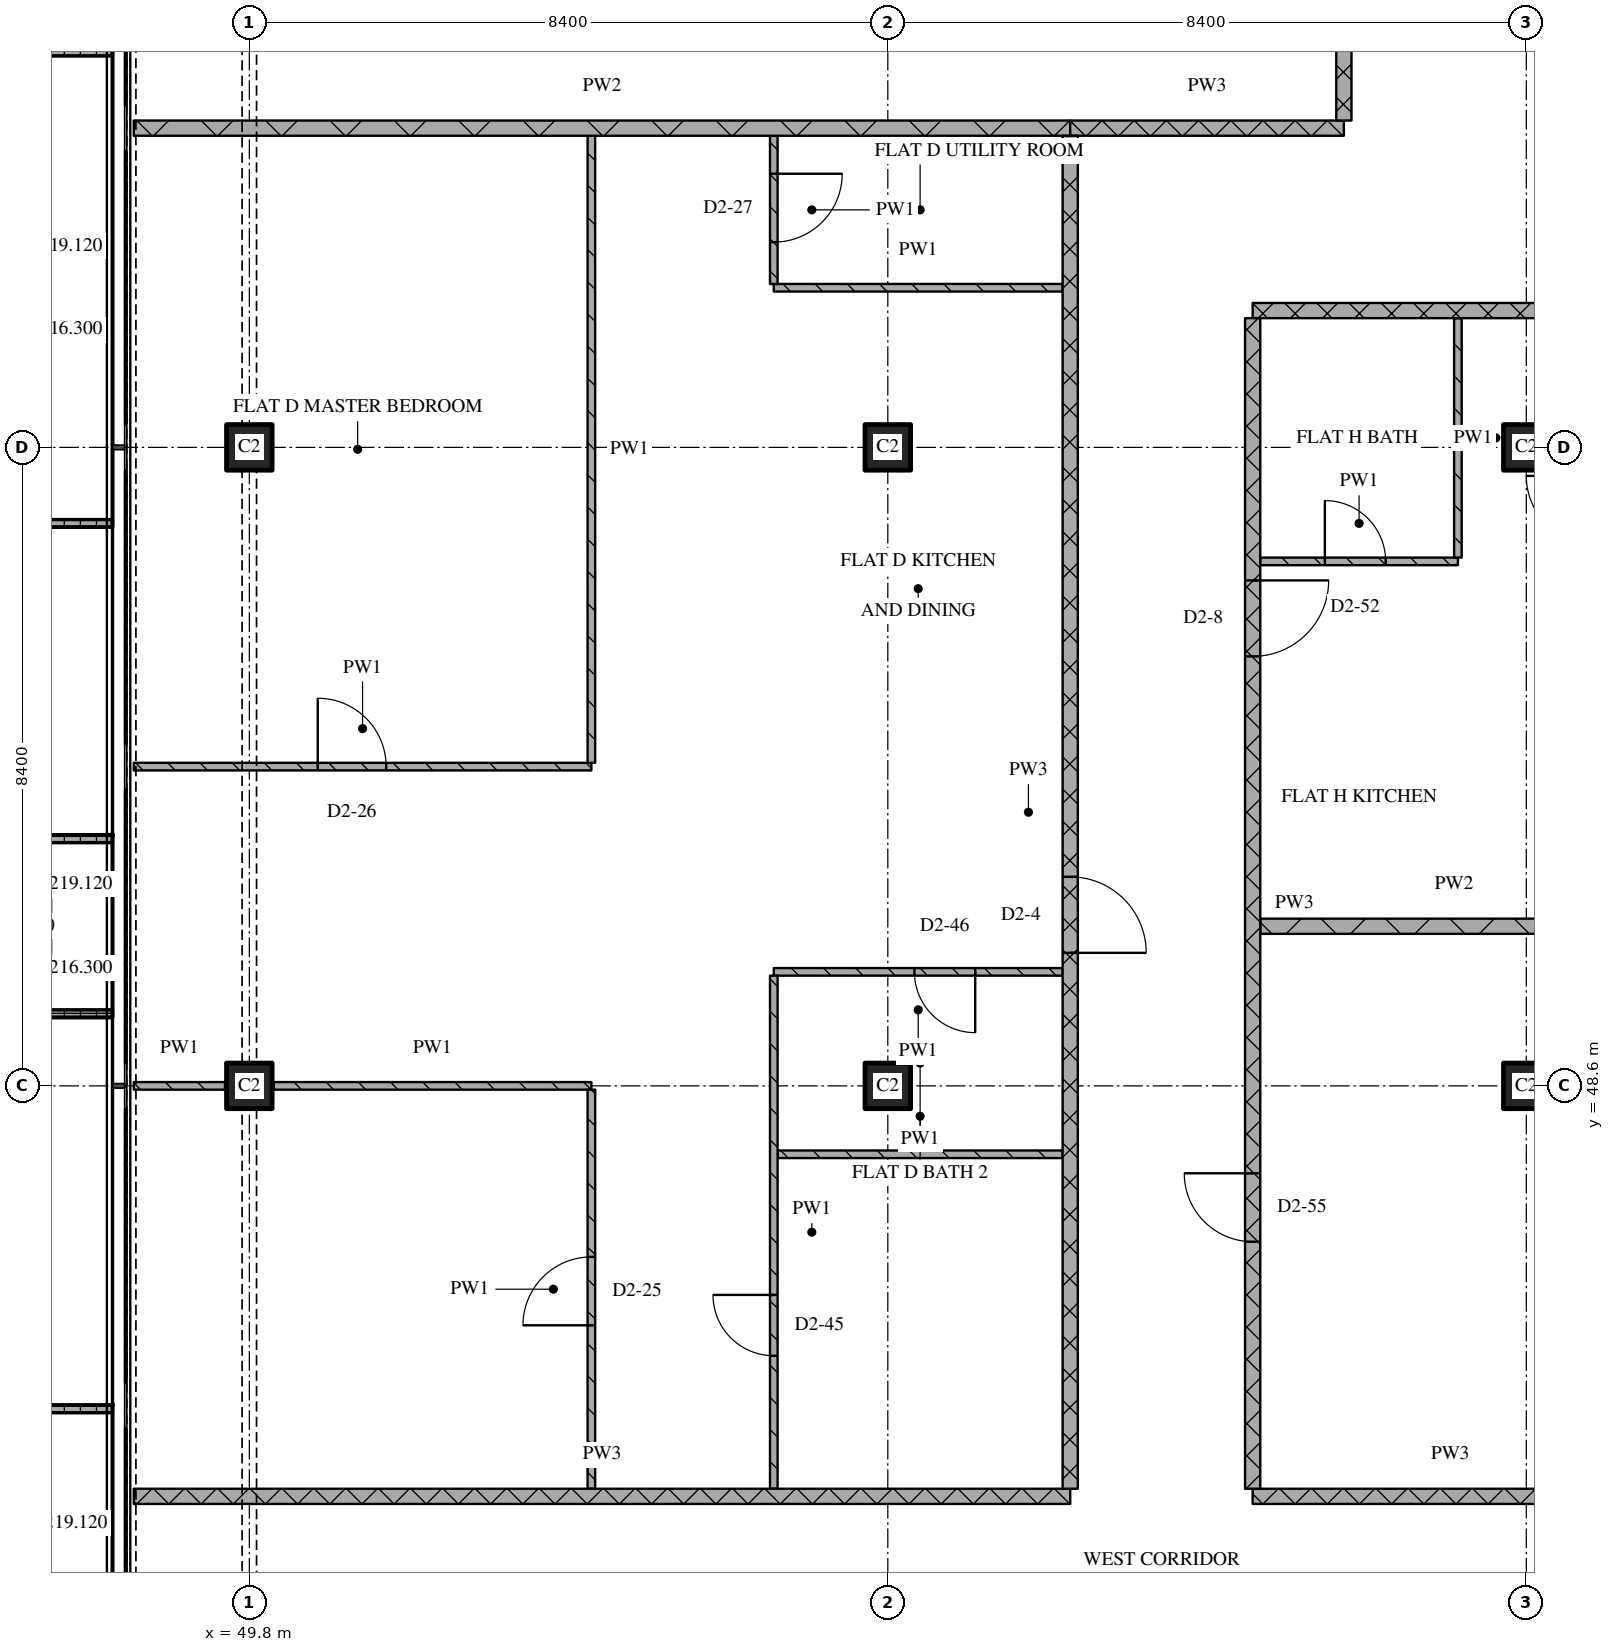
"""IFC4 building model, lengths in metres.
Left out: names, types, materials, properties, quantities, classifications, styles, units other than length and angle.
Written with IfcOpenShell. Run it as: python <this file> out.ifc"""

import sys

from ifc_helpers import new_model, si_unit, direction, frame, frame_2d, origin, origin_2d, place, context, subcontext, project, spatial, polyline, rectangle, outline, extrude, element, fill, save


model = new_model("IFC4")
c1 = context("Model", 3, precision=1e-05, world=origin(), true_north=direction((0.0, 1.0)))
c2 = subcontext(c1, "Body", "Model", "MODEL_VIEW")
j1 = project(units=[si_unit("LENGTHUNIT", "METRE"), si_unit("PLANEANGLEUNIT", "RADIAN")], contexts=[c1])
p1 = place(None, origin())
s1 = spatial("IfcSite", under=j1, at=p1, CompositionType="ELEMENT")
p2 = place(p1, origin())
s2 = spatial("IfcBuilding", under=s1, at=p2, CompositionType="ELEMENT")
p3 = place(p2, frame((0.0, 0.0, 216.3)))
s3 = spatial("IfcBuildingStorey", under=s2, at=p3, CompositionType="ELEMENT", Elevation=216.3)
for number, where, z_axis, x_axis in (
    (1, (49.8, 48.6, 0.0), (0.0, 0.0, 1.0), (1.0, 0.0, 0.0)),
    (2, (49.8, 57.0, 0.0), (0.0, 0.0, 1.0), (1.0, 0.0, 0.0)),
    (3, (58.2, 48.6, 0.0), (0.0, 0.0, 1.0), (1.0, 0.0, 0.0)),
    (4, (58.2, 57.0, 0.0), (0.0, 0.0, 1.0), (1.0, 0.0, 0.0)),
    (5, (66.6, 48.6, 0.0), (0.0, 0.0, 1.0), (1.0, 0.0, 0.0)),
    (6, (66.6, 57.0, 0.0), (0.0, 0.0, 1.0), (1.0, 0.0, 0.0)),
):
    element("IfcColumn", number, at=place(p3, frame(where, z_axis=z_axis, x_axis=x_axis)), inside=s3, PredefinedType="COLUMN", context=c2, shape_type="SweptSolid", body=[
        extrude(rectangle(XDim=0.6, YDim=0.6, at=origin_2d()), origin(), (0.0, 0.0, 1.0), 3.6),
    ])
p4 = place(p3, origin())
e7 = element("IfcWall", 7, at=p4, inside=s3, PredefinedType="SOLIDWALL", context=c2, shape_type="SweptSolid", body=[
    extrude(outline(polyline([(48.0, 62.25), (48.0, 62.15), (46.233, 62.15), (46.233, 56.05), (48.0, 56.05), (48.0, 55.95), (46.133, 55.95), (46.133, 62.25), (48.0, 62.25)])), origin(), (0.0, 0.0, 1.0), 1.0),
])
p5 = place(p3, origin())
e8 = element("IfcWall", 8, at=p5, inside=s3, PredefinedType="SOLIDWALL", context=c2, shape_type="SweptSolid", body=[
    extrude(outline(polyline([(48.0, 51.9), (48.0, 51.8), (46.5, 51.8), (46.5, 49.6), (48.0, 49.6), (48.0, 49.5), (46.4, 49.5), (46.4, 51.9), (48.0, 51.9)])), origin(), (0.0, 0.0, 1.0), 1.0),
])
p6 = place(p3, origin())
e9 = element("IfcWall", 9, at=p6, inside=s3, PredefinedType="SOLIDWALL", context=c2, shape_type="SweptSolid", body=[
    extrude(outline(polyline([(48.0, 44.4), (48.0, 44.3), (46.367, 44.3), (46.367, 40.3), (48.0, 40.3), (48.0, 40.2), (46.267, 40.2), (46.267, 44.4), (48.0, 44.4)])), origin(), (0.0, 0.0, 1.0), 1.0),
])
p7 = place(p3, frame((48.28, 43.2, 0.0), z_axis=(0.0, 0.0, 1.0), x_axis=(1.0, 0.0, 0.0)))
e10 = element("IfcWall", 10, at=p7, inside=s3, PredefinedType="PARTITIONING", context=c2, shape_type="SweptSolid", body=[
    extrude(rectangle(XDim=12.32, YDim=0.2, at=frame_2d((6.16, 0.0))), origin(), (0.0, 0.0, 1.0), 3.32),
])
p8 = place(p3, frame((63.0, 43.2, 0.0), z_axis=(0.0, 0.0, 1.0), x_axis=(1.0, 0.0, 0.0)))
e11 = element("IfcWall", 11, at=p8, inside=s3, PredefinedType="PARTITIONING", context=c2, shape_type="SweptSolid", body=[
    extrude(rectangle(XDim=5.2, YDim=0.2, at=frame_2d((2.6, 0.0))), origin(), (0.0, 0.0, 1.0), 3.32),
])
p9 = place(p3, frame((56.75, 47.7, 0.0), z_axis=(0.0, 0.0, 1.0), x_axis=(1.0, 0.0, 0.0)))
e12 = element("IfcWall", 12, at=p9, inside=s3, PredefinedType="PARTITIONING", context=c2, shape_type="SweptSolid", body=[
    extrude(rectangle(XDim=3.75, YDim=0.1, at=frame_2d((1.875, 0.0))), origin(), (0.0, 0.0, 1.0), 3.32),
])
p10 = place(p3, frame((48.28, 48.6, 0.0), z_axis=(0.0, 0.0, 1.0), x_axis=(1.0, 0.0, 0.0)))
e13 = element("IfcWall", 13, at=p10, inside=s3, PredefinedType="PARTITIONING", context=c2, shape_type="SweptSolid", body=[
    extrude(rectangle(XDim=1.2, YDim=0.1, at=frame_2d((0.6, 0.0))), origin(), (0.0, 0.0, 1.0), 3.32),
])
p11 = place(p3, frame((50.12, 48.6, 0.0), z_axis=(0.0, 0.0, 1.0), x_axis=(1.0, 0.0, 0.0)))
e14 = element("IfcWall", 14, at=p11, inside=s3, PredefinedType="PARTITIONING", context=c2, shape_type="SweptSolid", body=[
    extrude(rectangle(XDim=4.18, YDim=0.1, at=frame_2d((2.09, 0.0))), origin(), (0.0, 0.0, 1.0), 3.32),
])
p12 = place(p3, frame((60.5, 50.1, 0.0), z_axis=(0.0, 0.0, 1.0), x_axis=(-1.0, 0.0, 0.0)))
e15 = element("IfcWall", 15, at=p12, inside=s3, PredefinedType="PARTITIONING", context=c2, shape_type="SweptSolid", body=[
    extrude(rectangle(XDim=3.8, YDim=0.1, at=frame_2d((1.9, 0.0))), origin(), (0.0, 0.0, 1.0), 3.32),
])
p13 = place(p12, frame((1.15, 0.0, 0.0)))
e16 = element("IfcOpeningElement", 16, at=p13, cuts=e15, PredefinedType="OPENING", context=c2, shape_type="SweptSolid", body=[
    extrude(rectangle(XDim=0.8, YDim=2.1, at=frame_2d((0.4, 1.05))), frame((0.0, 0.06, 0.0), z_axis=(0.0, -1.0, 0.0), x_axis=(1.0, 0.0, 0.0)), (0.0, 0.0, 1.0), 0.12),
])
p14 = place(p3, frame((63.1, 50.7, 0.0), z_axis=(0.0, 0.0, 1.0), x_axis=(1.0, 0.0, 0.0)))
e17 = element("IfcWall", 17, at=p14, inside=s3, PredefinedType="PARTITIONING", context=c2, shape_type="SweptSolid", body=[
    extrude(rectangle(XDim=5.1, YDim=0.2, at=frame_2d((2.55, 0.0))), origin(), (0.0, 0.0, 1.0), 3.32),
])
p15 = place(p3, frame((48.28, 52.8, 0.0), z_axis=(0.0, 0.0, 1.0), x_axis=(1.0, 0.0, 0.0)))
e18 = element("IfcWall", 18, at=p15, inside=s3, PredefinedType="PARTITIONING", context=c2, shape_type="SweptSolid", body=[
    extrude(rectangle(XDim=6.02, YDim=0.1, at=frame_2d((3.01, 0.0))), origin(), (0.0, 0.0, 1.0), 3.32),
])
p16 = place(p15, frame((2.42, 0.0, 0.0)))
e19 = element("IfcOpeningElement", 19, at=p16, cuts=e18, PredefinedType="OPENING", context=c2, shape_type="SweptSolid", body=[
    extrude(rectangle(XDim=0.9, YDim=2.1, at=frame_2d((0.45, 1.05))), frame((0.0, 0.06, 0.0), z_axis=(0.0, -1.0, 0.0), x_axis=(1.0, 0.0, 0.0)), (0.0, 0.0, 1.0), 0.12),
])
p17 = place(p3, frame((63.1, 55.5, 0.0), z_axis=(0.0, 0.0, 1.0), x_axis=(1.0, 0.0, 0.0)))
e20 = element("IfcWall", 20, at=p17, inside=s3, PredefinedType="PARTITIONING", context=c2, shape_type="SweptSolid", body=[
    extrude(rectangle(XDim=2.6, YDim=0.1, at=frame_2d((1.3, 0.0))), origin(), (0.0, 0.0, 1.0), 3.32),
])
p18 = place(p17, frame((0.85, 0.0, 0.0)))
e21 = element("IfcOpeningElement", 21, at=p18, cuts=e20, PredefinedType="OPENING", context=c2, shape_type="SweptSolid", body=[
    extrude(rectangle(XDim=0.8, YDim=2.1, at=frame_2d((0.4, 1.05))), frame((0.0, 0.06, 0.0), z_axis=(0.0, -1.0, 0.0), x_axis=(1.0, 0.0, 0.0)), (0.0, 0.0, 1.0), 0.12),
])
p19 = place(p3, frame((63.0, 58.8, 0.0), z_axis=(0.0, 0.0, 1.0), x_axis=(1.0, 0.0, 0.0)))
e22 = element("IfcWall", 22, at=p19, inside=s3, PredefinedType="PARTITIONING", context=c2, shape_type="SweptSolid", body=[
    extrude(rectangle(XDim=10.8, YDim=0.2, at=frame_2d((5.4, 0.0))), origin(), (0.0, 0.0, 1.0), 3.32),
])
p20 = place(p3, frame((56.7, 59.1, 0.0), z_axis=(0.0, 0.0, 1.0), x_axis=(1.0, 0.0, 0.0)))
e23 = element("IfcWall", 23, at=p20, inside=s3, PredefinedType="PARTITIONING", context=c2, shape_type="SweptSolid", body=[
    extrude(rectangle(XDim=3.8, YDim=0.1, at=frame_2d((1.9, 0.0))), origin(), (0.0, 0.0, 1.0), 3.32),
])
p21 = place(p3, frame((60.6, 61.2, 0.0), z_axis=(0.0, 0.0, 1.0), x_axis=(1.0, 0.0, 0.0)))
e24 = element("IfcWall", 24, at=p21, inside=s3, PredefinedType="PARTITIONING", context=c2, shape_type="SweptSolid", body=[
    extrude(rectangle(XDim=3.6, YDim=0.2, at=frame_2d((1.8, 0.0))), origin(), (0.0, 0.0, 1.0), 3.32),
])
p22 = place(p3, frame((48.28, 61.2, 0.0), z_axis=(0.0, 0.0, 1.0), x_axis=(1.0, 0.0, 0.0)))
e25 = element("IfcWall", 25, at=p22, inside=s3, PredefinedType="PARTITIONING", context=c2, shape_type="SweptSolid", body=[
    extrude(rectangle(XDim=12.32, YDim=0.2, at=frame_2d((6.16, 0.0))), origin(), (0.0, 0.0, 1.0), 3.32),
])
p23 = place(p3, frame((54.3, 43.3, 0.0), z_axis=(0.0, 0.0, 1.0), x_axis=(0.0, 1.0, 0.0)))
e26 = element("IfcWall", 26, at=p23, inside=s3, PredefinedType="PARTITIONING", context=c2, shape_type="SweptSolid", body=[
    extrude(rectangle(XDim=5.25, YDim=0.1, at=frame_2d((2.625, 0.0))), origin(), (0.0, 0.0, 1.0), 3.32),
])
p24 = place(p23, frame((2.15, 0.0, 0.0)))
e27 = element("IfcOpeningElement", 27, at=p24, cuts=e26, PredefinedType="OPENING", context=c2, shape_type="SweptSolid", body=[
    extrude(rectangle(XDim=0.9, YDim=2.1, at=frame_2d((0.45, 1.05))), frame((0.0, 0.06, 0.0), z_axis=(0.0, -1.0, 0.0), x_axis=(1.0, 0.0, 0.0)), (0.0, 0.0, 1.0), 0.12),
])
p25 = place(p3, frame((54.3, 61.1, 0.0), z_axis=(0.0, 0.0, 1.0), x_axis=(0.0, -1.0, 0.0)))
e28 = element("IfcWall", 28, at=p25, inside=s3, PredefinedType="PARTITIONING", context=c2, shape_type="SweptSolid", body=[
    extrude(rectangle(XDim=8.25, YDim=0.1, at=frame_2d((4.125, 0.0))), origin(), (0.0, 0.0, 1.0), 3.32),
])
p26 = place(p3, frame((56.7, 50.05, 0.0), z_axis=(0.0, 0.0, 1.0), x_axis=(0.0, -1.0, 0.0)))
e29 = element("IfcWall", 29, at=p26, inside=s3, PredefinedType="PARTITIONING", context=c2, shape_type="SweptSolid", body=[
    extrude(rectangle(XDim=6.75, YDim=0.1, at=frame_2d((3.375, 0.0))), origin(), (0.0, 0.0, 1.0), 3.32),
])
p27 = place(p26, frame((4.2, 0.0, 0.0)))
e30 = element("IfcOpeningElement", 30, at=p27, cuts=e29, PredefinedType="OPENING", context=c2, shape_type="SweptSolid", body=[
    extrude(rectangle(XDim=0.8, YDim=2.1, at=frame_2d((0.4, 1.05))), frame((0.0, 0.06, 0.0), z_axis=(0.0, -1.0, 0.0), x_axis=(1.0, 0.0, 0.0)), (0.0, 0.0, 1.0), 0.12),
])
p28 = place(p3, frame((56.7, 61.1, 0.0), z_axis=(0.0, 0.0, 1.0), x_axis=(0.0, -1.0, 0.0)))
e31 = element("IfcWall", 31, at=p28, inside=s3, PredefinedType="PARTITIONING", context=c2, shape_type="SweptSolid", body=[
    extrude(rectangle(XDim=1.95, YDim=0.1, at=frame_2d((0.975, 0.0))), origin(), (0.0, 0.0, 1.0), 3.32),
])
p29 = place(p28, frame((0.5, 0.0, 0.0)))
e32 = element("IfcOpeningElement", 32, at=p29, cuts=e31, PredefinedType="OPENING", context=c2, shape_type="SweptSolid", body=[
    extrude(rectangle(XDim=0.9, YDim=2.1, at=frame_2d((0.45, 1.05))), frame((0.0, 0.06, 0.0), z_axis=(0.0, -1.0, 0.0), x_axis=(1.0, 0.0, 0.0)), (0.0, 0.0, 1.0), 0.12),
])
p30 = place(p3, frame((60.6, 43.3, 0.0), z_axis=(0.0, 0.0, 1.0), x_axis=(0.0, 1.0, 0.0)))
e33 = element("IfcWall", 33, at=p30, inside=s3, PredefinedType="PARTITIONING", context=c2, shape_type="SweptSolid", body=[
    extrude(rectangle(XDim=17.8, YDim=0.2, at=frame_2d((8.9, 0.0))), origin(), (0.0, 0.0, 1.0), 3.32),
])
p31 = place(p30, frame((7.05, 0.0, 0.0)))
e34 = element("IfcOpeningElement", 34, at=p31, cuts=e33, PredefinedType="OPENING", context=c2, shape_type="SweptSolid", body=[
    extrude(rectangle(XDim=1.0, YDim=2.1, at=frame_2d((0.5, 1.05))), frame((0.0, 0.11, 0.0), z_axis=(0.0, -1.0, 0.0), x_axis=(1.0, 0.0, 0.0)), (0.0, 0.0, 1.0), 0.22),
])
p32 = place(p3, frame((63.0, 58.7, 0.0), z_axis=(0.0, 0.0, 1.0), x_axis=(0.0, -1.0, 0.0)))
e35 = element("IfcWall", 35, at=p32, inside=s3, PredefinedType="PARTITIONING", context=c2, shape_type="SweptSolid", body=[
    extrude(rectangle(XDim=15.4, YDim=0.2, at=frame_2d((7.7, 0.0))), origin(), (0.0, 0.0, 1.0), 3.32),
])
p33 = place(p32, frame((3.45, 0.0, 0.0)))
e36 = element("IfcOpeningElement", 36, at=p33, cuts=e35, PredefinedType="OPENING", context=c2, shape_type="SweptSolid", body=[
    extrude(rectangle(XDim=1.0, YDim=2.1, at=frame_2d((0.5, 1.05))), frame((0.0, 0.11, 0.0), z_axis=(0.0, -1.0, 0.0), x_axis=(1.0, 0.0, 0.0)), (0.0, 0.0, 1.0), 0.22),
])
p34 = place(p32, frame((11.25, 0.0, 0.0)))
e37 = element("IfcOpeningElement", 37, at=p34, cuts=e35, PredefinedType="OPENING", context=c2, shape_type="SweptSolid", body=[
    extrude(rectangle(XDim=0.9, YDim=2.1, at=frame_2d((0.45, 1.05))), frame((0.0, 0.11, 0.0), z_axis=(0.0, -1.0, 0.0), x_axis=(1.0, 0.0, 0.0)), (0.0, 0.0, 1.0), 0.22),
])
p35 = place(p3, frame((64.2, 61.3, 0.0), z_axis=(0.0, 0.0, 1.0), x_axis=(0.0, 1.0, 0.0)))
e38 = element("IfcWall", 38, at=p35, inside=s3, PredefinedType="PARTITIONING", context=c2, shape_type="SweptSolid", body=[
    extrude(rectangle(XDim=14.02, YDim=0.2, at=frame_2d((7.01, 0.0))), origin(), (0.0, 0.0, 1.0), 3.32),
])
p36 = place(p35, frame((8.55, 0.0, 0.0)))
e39 = element("IfcOpeningElement", 39, at=p36, cuts=e38, PredefinedType="OPENING", context=c2, shape_type="SweptSolid", body=[
    extrude(rectangle(XDim=1.0, YDim=2.1, at=frame_2d((0.5, 1.05))), frame((0.0, 0.11, 0.0), z_axis=(0.0, -1.0, 0.0), x_axis=(1.0, 0.0, 0.0)), (0.0, 0.0, 1.0), 0.22),
])
p37 = place(p3, frame((65.7, 58.7, 0.0), z_axis=(0.0, 0.0, 1.0), x_axis=(0.0, -1.0, 0.0)))
e40 = element("IfcWall", 40, at=p37, inside=s3, PredefinedType="PARTITIONING", context=c2, shape_type="SweptSolid", body=[
    extrude(rectangle(XDim=3.15, YDim=0.1, at=frame_2d((1.575, 0.0))), origin(), (0.0, 0.0, 1.0), 3.32),
])
p38 = place(p13, origin())
e41 = element("IfcDoor", 41, at=p38, inside=s3, OperationType="SINGLE_SWING_LEFT", PredefinedType="DOOR", context=c2, shape_type="SweptSolid", body=[
    extrude(rectangle(XDim=0.8, YDim=2.1, at=frame_2d((0.4, 1.05))), frame((0.0, 0.025, 0.0), z_axis=(0.0, -1.0, 0.0), x_axis=(1.0, 0.0, 0.0)), (0.0, 0.0, 1.0), 0.05),
])
fill(e16, e41)
p39 = place(p16, origin())
e42 = element("IfcDoor", 42, at=p39, inside=s3, OperationType="SINGLE_SWING_LEFT", PredefinedType="DOOR", context=c2, shape_type="SweptSolid", body=[
    extrude(rectangle(XDim=0.9, YDim=2.1, at=frame_2d((0.45, 1.05))), frame((0.0, 0.025, 0.0), z_axis=(0.0, -1.0, 0.0), x_axis=(1.0, 0.0, 0.0)), (0.0, 0.0, 1.0), 0.05),
])
fill(e19, e42)
p40 = place(p18, origin())
e43 = element("IfcDoor", 43, at=p40, inside=s3, OperationType="SINGLE_SWING_LEFT", PredefinedType="DOOR", context=c2, shape_type="SweptSolid", body=[
    extrude(rectangle(XDim=0.8, YDim=2.1, at=frame_2d((0.4, 1.05))), frame((0.0, 0.025, 0.0), z_axis=(0.0, -1.0, 0.0), x_axis=(1.0, 0.0, 0.0)), (0.0, 0.0, 1.0), 0.05),
])
fill(e21, e43)
p41 = place(p24, origin())
e44 = element("IfcDoor", 44, at=p41, inside=s3, OperationType="SINGLE_SWING_LEFT", PredefinedType="DOOR", context=c2, shape_type="SweptSolid", body=[
    extrude(rectangle(XDim=0.9, YDim=2.1, at=frame_2d((0.45, 1.05))), frame((0.0, 0.025, 0.0), z_axis=(0.0, -1.0, 0.0), x_axis=(1.0, 0.0, 0.0)), (0.0, 0.0, 1.0), 0.05),
])
fill(e27, e44)
p42 = place(p27, origin())
e45 = element("IfcDoor", 45, at=p42, inside=s3, OperationType="SINGLE_SWING_RIGHT", PredefinedType="DOOR", context=c2, shape_type="SweptSolid", body=[
    extrude(rectangle(XDim=0.8, YDim=2.1, at=frame_2d((0.4, 1.05))), frame((0.0, 0.025, 0.0), z_axis=(0.0, -1.0, 0.0), x_axis=(1.0, 0.0, 0.0)), (0.0, 0.0, 1.0), 0.05),
])
fill(e30, e45)
p43 = place(p29, origin())
e46 = element("IfcDoor", 46, at=p43, inside=s3, OperationType="SINGLE_SWING_LEFT", PredefinedType="DOOR", context=c2, shape_type="SweptSolid", body=[
    extrude(rectangle(XDim=0.9, YDim=2.1, at=frame_2d((0.45, 1.05))), frame((0.0, 0.025, 0.0), z_axis=(0.0, -1.0, 0.0), x_axis=(1.0, 0.0, 0.0)), (0.0, 0.0, 1.0), 0.05),
])
fill(e32, e46)
p44 = place(p31, origin())
e47 = element("IfcDoor", 47, at=p44, inside=s3, OperationType="SINGLE_SWING_RIGHT", PredefinedType="DOOR", context=c2, shape_type="SweptSolid", body=[
    extrude(rectangle(XDim=1.0, YDim=2.1, at=frame_2d((0.5, 1.05))), frame((0.0, 0.025, 0.0), z_axis=(0.0, -1.0, 0.0), x_axis=(1.0, 0.0, 0.0)), (0.0, 0.0, 1.0), 0.05),
])
fill(e34, e47)
p45 = place(p33, origin())
e48 = element("IfcDoor", 48, at=p45, inside=s3, OperationType="SINGLE_SWING_LEFT", PredefinedType="DOOR", context=c2, shape_type="SweptSolid", body=[
    extrude(rectangle(XDim=1.0, YDim=2.1, at=frame_2d((0.5, 1.05))), frame((0.0, 0.025, 0.0), z_axis=(0.0, -1.0, 0.0), x_axis=(1.0, 0.0, 0.0)), (0.0, 0.0, 1.0), 0.05),
])
fill(e36, e48)
p46 = place(p34, origin())
e49 = element("IfcDoor", 49, at=p46, inside=s3, OperationType="SINGLE_SWING_RIGHT", PredefinedType="DOOR", context=c2, shape_type="SweptSolid", body=[
    extrude(rectangle(XDim=0.9, YDim=2.1, at=frame_2d((0.45, 1.05))), frame((0.0, 0.025, 0.0), z_axis=(0.0, -1.0, 0.0), x_axis=(1.0, 0.0, 0.0)), (0.0, 0.0, 1.0), 0.05),
])
fill(e37, e49)
save(model, sys.argv[1])
